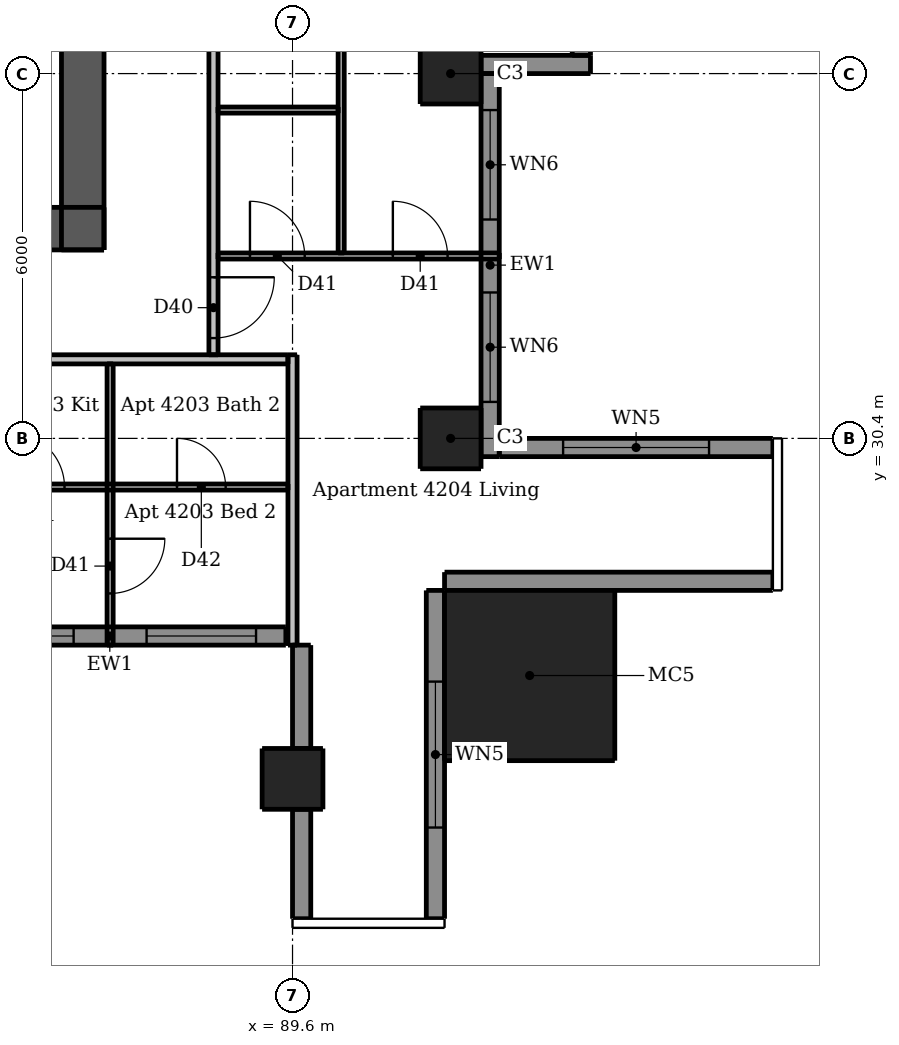
"""IFC4 building model, lengths in metres.
Left out: names, types, materials, properties, quantities, classifications, styles, units other than length and angle.
Written with IfcOpenShell. Run it as: python <this file> out.ifc"""

import sys

from ifc_helpers import new_model, si_unit, direction, frame, frame_2d, origin, origin_2d, place, context, subcontext, project, spatial, rectangle, extrude, element, fill, save


model = new_model("IFC4")
c1 = context("Model", 3, precision=1e-05, world=origin(), true_north=direction((0.0, 1.0)))
c2 = subcontext(c1, "Body", "Model", "MODEL_VIEW")
j1 = project(units=[si_unit("LENGTHUNIT", "METRE"), si_unit("PLANEANGLEUNIT", "RADIAN")], contexts=[c1])
p1 = place(None, origin())
s1 = spatial("IfcSite", under=j1, at=p1, CompositionType="ELEMENT")
p2 = place(p1, origin())
s2 = spatial("IfcBuilding", under=s1, at=p2, CompositionType="ELEMENT")
p3 = place(p2, frame((0.0, 0.0, 158.2)))
s3 = spatial("IfcBuildingStorey", under=s2, at=p3, CompositionType="ELEMENT", Elevation=158.2)
p4 = place(p3, frame((62.5, 33.85, 0.0), z_axis=(0.0, 0.0, 1.0), x_axis=(1.0, 0.0, 0.0)))
e1 = element("IfcWall", 1, at=p4, inside=s3, PredefinedType="SHEAR", context=c2, shape_type="SweptSolid", body=[
    extrude(rectangle(XDim=24.0, YDim=0.7, at=frame_2d((12.0, 0.0))), origin(), (0.0, 0.0, 1.0), 3.05),
])
p5 = place(p4, frame((1.962, 0.0, 0.0)))
e2 = element("IfcOpeningElement", 2, at=p5, cuts=e1, PredefinedType="OPENING", context=c2, shape_type="SweptSolid", body=[
    extrude(rectangle(XDim=1.1, YDim=2.1, at=frame_2d((0.55, 1.05))), frame((0.0, 0.36, 0.0), z_axis=(0.0, -1.0, 0.0), x_axis=(1.0, 0.0, 0.0)), (0.0, 0.0, 1.0), 0.72),
])
p6 = place(p4, frame((20.938, 0.0, 0.0)))
e3 = element("IfcOpeningElement", 3, at=p6, cuts=e1, PredefinedType="OPENING", context=c2, shape_type="SweptSolid", body=[
    extrude(rectangle(XDim=1.1, YDim=2.1, at=frame_2d((0.55, 1.05))), frame((0.0, 0.36, 0.0), z_axis=(0.0, -1.0, 0.0), x_axis=(1.0, 0.0, 0.0)), (0.0, 0.0, 1.0), 0.72),
])
p7 = place(p4, frame((8.0, 0.0, 0.0)))
e4 = element("IfcOpeningElement", 4, at=p7, cuts=e1, PredefinedType="OPENING", context=c2, shape_type="SweptSolid", body=[
    extrude(rectangle(XDim=1.1, YDim=2.1, at=frame_2d((0.55, 1.05))), frame((0.0, 0.36, 0.0), z_axis=(0.0, -1.0, 0.0), x_axis=(1.0, 0.0, 0.0)), (0.0, 0.0, 1.0), 0.72),
])
p8 = place(p4, frame((13.512, 0.0, 0.0)))
e5 = element("IfcOpeningElement", 5, at=p8, cuts=e1, PredefinedType="OPENING", context=c2, shape_type="SweptSolid", body=[
    extrude(rectangle(XDim=0.9, YDim=2.1, at=frame_2d((0.45, 1.05))), frame((0.0, 0.36, 0.0), z_axis=(0.0, -1.0, 0.0), x_axis=(1.0, 0.0, 0.0)), (0.0, 0.0, 1.0), 0.72),
])
p9 = place(p4, frame((17.087, 0.0, 0.0)))
e6 = element("IfcOpeningElement", 6, at=p9, cuts=e1, PredefinedType="OPENING", context=c2, shape_type="SweptSolid", body=[
    extrude(rectangle(XDim=0.9, YDim=2.1, at=frame_2d((0.45, 1.05))), frame((0.0, 0.36, 0.0), z_axis=(0.0, -1.0, 0.0), x_axis=(1.0, 0.0, 0.0)), (0.0, 0.0, 1.0), 0.72),
])
p10 = place(p3, frame((86.15, 33.5, 0.0), z_axis=(0.0, 0.0, 1.0), x_axis=(0.0, 1.0, 0.0)))
e7 = element("IfcWall", 7, at=p10, inside=s3, PredefinedType="SHEAR", context=c2, shape_type="SweptSolid", body=[
    extrude(rectangle(XDim=24.0, YDim=0.7, at=frame_2d((12.0, 0.0))), origin(), (0.0, 0.0, 1.0), 3.05),
])
p11 = place(p10, frame((11.2, 0.0, 0.0)))
e8 = element("IfcOpeningElement", 8, at=p11, cuts=e7, PredefinedType="OPENING", context=c2, shape_type="SweptSolid", body=[
    extrude(rectangle(XDim=1.6, YDim=2.1, at=frame_2d((0.8, 1.05))), frame((0.0, 0.36, 0.0), z_axis=(0.0, -1.0, 0.0), x_axis=(1.0, 0.0, 0.0)), (0.0, 0.0, 1.0), 0.72),
])
for number, where, z_axis, x_axis in (
    (9, (89.6, 24.8, 0.0), (0.0, 0.0, 1.0), (1.0, 0.0, 0.0)),
    (10, (92.2, 30.4, 0.0), (0.0, 0.0, 1.0), (1.0, 0.0, 0.0)),
    (11, (92.2, 36.4, 0.0), (0.0, 0.0, 1.0), (1.0, 0.0, 0.0)),
):
    element("IfcColumn", number, at=place(p3, frame(where, z_axis=z_axis, x_axis=x_axis)), inside=s3, PredefinedType="COLUMN", context=c2, shape_type="SweptSolid", body=[
        extrude(rectangle(XDim=1.0, YDim=1.0, at=origin_2d()), origin(), (0.0, 0.0, 1.0), 3.05),
    ])
p12 = place(p3, frame((93.5, 26.5, 0.0), z_axis=(0.0, 0.0, 1.0), x_axis=(1.0, 0.0, 0.0)))
e12 = element("IfcColumn", 12, at=p12, inside=s3, PredefinedType="COLUMN", context=c2, shape_type="SweptSolid", body=[
    extrude(rectangle(XDim=2.8, YDim=2.8, at=origin_2d()), origin(), (0.0, 0.0, 1.0), 3.3),
])
p13 = place(p3, frame((89.75, 27.0, 0.0), z_axis=(0.0, 0.0, 1.0), x_axis=(0.0, -1.0, 0.0)))
e13 = element("IfcWall", 13, at=p13, inside=s3, PredefinedType="SOLIDWALL", context=c2, shape_type="SweptSolid", body=[
    extrude(rectangle(XDim=1.7, YDim=0.3, at=frame_2d((0.85, 0.0))), origin(), (0.0, 0.0, 1.0), 3.05),
])
p14 = place(p3, frame((89.75, 24.3, 0.0), z_axis=(0.0, 0.0, 1.0), x_axis=(0.0, -1.0, 0.0)))
e14 = element("IfcWall", 14, at=p14, inside=s3, PredefinedType="SOLIDWALL", context=c2, shape_type="SweptSolid", body=[
    extrude(rectangle(XDim=1.8, YDim=0.3, at=frame_2d((0.9, 0.0))), origin(), (0.0, 0.0, 1.0), 3.05),
])
p15 = place(p3, frame((91.95, 22.5, 0.0), z_axis=(0.0, 0.0, 1.0), x_axis=(0.0, 1.0, 0.0)))
e15 = element("IfcWall", 15, at=p15, inside=s3, PredefinedType="SOLIDWALL", context=c2, shape_type="SweptSolid", body=[
    extrude(rectangle(XDim=5.4, YDim=0.3, at=frame_2d((2.7, 0.0))), origin(), (0.0, 0.0, 1.0), 3.05),
])
p16 = place(p15, frame((1.5, 0.0, 0.15)))
e16 = element("IfcOpeningElement", 16, at=p16, cuts=e15, PredefinedType="OPENING", context=c2, shape_type="SweptSolid", body=[
    extrude(rectangle(XDim=2.4, YDim=2.1, at=frame_2d((1.2, 1.05))), frame((0.0, 0.16, 0.0), z_axis=(0.0, -1.0, 0.0), x_axis=(1.0, 0.0, 0.0)), (0.0, 0.0, 1.0), 0.32),
])
p17 = place(p3, frame((92.1, 28.05, 0.0), z_axis=(0.0, 0.0, 1.0), x_axis=(1.0, 0.0, 0.0)))
e17 = element("IfcWall", 17, at=p17, inside=s3, PredefinedType="SOLIDWALL", context=c2, shape_type="SweptSolid", body=[
    extrude(rectangle(XDim=5.4, YDim=0.3, at=frame_2d((2.7, 0.0))), origin(), (0.0, 0.0, 1.0), 3.05),
])
p18 = place(p3, frame((97.5, 30.25, 0.0), z_axis=(0.0, 0.0, 1.0), x_axis=(-1.0, 0.0, 0.0)))
e18 = element("IfcWall", 18, at=p18, inside=s3, PredefinedType="SOLIDWALL", context=c2, shape_type="SweptSolid", body=[
    extrude(rectangle(XDim=4.5, YDim=0.3, at=frame_2d((2.25, 0.0))), origin(), (0.0, 0.0, 1.0), 3.05),
])
p19 = place(p18, frame((1.05, 0.0, 0.15)))
e19 = element("IfcOpeningElement", 19, at=p19, cuts=e18, PredefinedType="OPENING", context=c2, shape_type="SweptSolid", body=[
    extrude(rectangle(XDim=2.4, YDim=2.1, at=frame_2d((1.2, 1.05))), frame((0.0, 0.16, 0.0), z_axis=(0.0, -1.0, 0.0), x_axis=(1.0, 0.0, 0.0)), (0.0, 0.0, 1.0), 0.32),
])
p20 = place(p3, frame((92.7, 36.55, 0.0), z_axis=(0.0, 0.0, 1.0), x_axis=(1.0, 0.0, 0.0)))
e20 = element("IfcWall", 20, at=p20, inside=s3, PredefinedType="SOLIDWALL", context=c2, shape_type="SweptSolid", body=[
    extrude(rectangle(XDim=1.8, YDim=0.3, at=frame_2d((0.9, 0.0))), origin(), (0.0, 0.0, 1.0), 3.05),
])
p21 = place(p3, frame((83.7, 27.15, 0.0), z_axis=(0.0, 0.0, 1.0), x_axis=(1.0, 0.0, 0.0)))
e21 = element("IfcWall", 21, at=p21, inside=s3, PredefinedType="SOLIDWALL", context=c2, shape_type="SweptSolid", body=[
    extrude(rectangle(XDim=5.79, YDim=0.3, at=frame_2d((2.895, 0.0))), origin(), (0.0, 0.0, 1.0), 3.05),
])
p22 = place(p21, frame((0.5, 0.0, 0.15)))
e22 = element("IfcOpeningElement", 22, at=p22, cuts=e21, PredefinedType="OPENING", context=c2, shape_type="SweptSolid", body=[
    extrude(rectangle(XDim=1.8, YDim=2.1, at=frame_2d((0.9, 1.05))), frame((0.0, 0.16, 0.0), z_axis=(0.0, -1.0, 0.0), x_axis=(1.0, 0.0, 0.0)), (0.0, 0.0, 1.0), 0.32),
])
p23 = place(p21, frame((3.5, 0.0, 0.15)))
e23 = element("IfcOpeningElement", 23, at=p23, cuts=e21, PredefinedType="OPENING", context=c2, shape_type="SweptSolid", body=[
    extrude(rectangle(XDim=1.8, YDim=2.1, at=frame_2d((0.9, 1.05))), frame((0.0, 0.16, 0.0), z_axis=(0.0, -1.0, 0.0), x_axis=(1.0, 0.0, 0.0)), (0.0, 0.0, 1.0), 0.32),
])
p24 = place(p3, frame((92.85, 30.1, 0.0), z_axis=(0.0, 0.0, 1.0), x_axis=(0.0, 1.0, 0.0)))
e24 = element("IfcWall", 24, at=p24, inside=s3, PredefinedType="SOLIDWALL", context=c2, shape_type="SweptSolid", body=[
    extrude(rectangle(XDim=6.3, YDim=0.3, at=frame_2d((3.15, 0.0))), origin(), (0.0, 0.0, 1.0), 3.05),
])
p25 = place(p24, frame((0.9, 0.0, 0.15)))
e25 = element("IfcOpeningElement", 25, at=p25, cuts=e24, PredefinedType="OPENING", context=c2, shape_type="SweptSolid", body=[
    extrude(rectangle(XDim=1.8, YDim=2.1, at=frame_2d((0.9, 1.05))), frame((0.0, 0.16, 0.0), z_axis=(0.0, -1.0, 0.0), x_axis=(1.0, 0.0, 0.0)), (0.0, 0.0, 1.0), 0.32),
])
p26 = place(p24, frame((3.9, 0.0, 0.15)))
e26 = element("IfcOpeningElement", 26, at=p26, cuts=e24, PredefinedType="OPENING", context=c2, shape_type="SweptSolid", body=[
    extrude(rectangle(XDim=1.8, YDim=2.1, at=frame_2d((0.9, 1.05))), frame((0.0, 0.16, 0.0), z_axis=(0.0, -1.0, 0.0), x_axis=(1.0, 0.0, 0.0)), (0.0, 0.0, 1.0), 0.32),
])
p27 = place(p3, frame((94.35, 36.7, 0.0), z_axis=(0.0, 0.0, 1.0), x_axis=(0.0, 1.0, 0.0)))
e27 = element("IfcWall", 27, at=p27, inside=s3, PredefinedType="SOLIDWALL", context=c2, shape_type="SweptSolid", body=[
    extrude(rectangle(XDim=5.6, YDim=0.3, at=frame_2d((2.8, 0.0))), origin(), (0.0, 0.0, 1.0), 3.05),
])
p28 = place(p27, frame((0.3, 0.0, 0.15)))
e28 = element("IfcOpeningElement", 28, at=p28, cuts=e27, PredefinedType="OPENING", context=c2, shape_type="SweptSolid", body=[
    extrude(rectangle(XDim=1.8, YDim=2.1, at=frame_2d((0.9, 1.05))), frame((0.0, 0.16, 0.0), z_axis=(0.0, -1.0, 0.0), x_axis=(1.0, 0.0, 0.0)), (0.0, 0.0, 1.0), 0.32),
])
p29 = place(p27, frame((3.3, 0.0, 0.15)))
e29 = element("IfcOpeningElement", 29, at=p29, cuts=e27, PredefinedType="OPENING", context=c2, shape_type="SweptSolid", body=[
    extrude(rectangle(XDim=1.8, YDim=2.1, at=frame_2d((0.9, 1.05))), frame((0.0, 0.16, 0.0), z_axis=(0.0, -1.0, 0.0), x_axis=(1.0, 0.0, 0.0)), (0.0, 0.0, 1.0), 0.32),
])
p30 = place(p3, frame((86.6, 31.625, 0.0), z_axis=(0.0, 0.0, 1.0), x_axis=(0.0, -1.0, 0.0)))
e30 = element("IfcWall", 30, at=p30, inside=s3, PredefinedType="PARTITIONING", context=c2, shape_type="SweptSolid", body=[
    extrude(rectangle(XDim=4.625, YDim=0.1, at=frame_2d((2.312, 0.0))), origin(), (0.0, 0.0, 1.0), 3.05),
])
p31 = place(p30, frame((2.875, 0.0, 0.0)))
e31 = element("IfcOpeningElement", 31, at=p31, cuts=e30, PredefinedType="OPENING", context=c2, shape_type="SweptSolid", body=[
    extrude(rectangle(XDim=0.9, YDim=2.1, at=frame_2d((0.45, 1.05))), frame((0.0, 0.06, 0.0), z_axis=(0.0, -1.0, 0.0), x_axis=(1.0, 0.0, 0.0)), (0.0, 0.0, 1.0), 0.12),
])
p32 = place(p3, frame((90.4, 33.45, 0.0), z_axis=(0.0, 0.0, 1.0), x_axis=(0.0, 1.0, 0.0)))
e32 = element("IfcWall", 32, at=p32, inside=s3, PredefinedType="PARTITIONING", context=c2, shape_type="SweptSolid", body=[
    extrude(rectangle(XDim=8.1, YDim=0.1, at=frame_2d((4.05, 0.0))), origin(), (0.0, 0.0, 1.0), 3.05),
])
p33 = place(p32, frame((3.75, 0.0, 0.0)))
e33 = element("IfcOpeningElement", 33, at=p33, cuts=e32, PredefinedType="OPENING", context=c2, shape_type="SweptSolid", body=[
    extrude(rectangle(XDim=0.8, YDim=2.1, at=frame_2d((0.4, 1.05))), frame((0.0, 0.06, 0.0), z_axis=(0.0, -1.0, 0.0), x_axis=(1.0, 0.0, 0.0)), (0.0, 0.0, 1.0), 0.12),
])
p34 = place(p32, frame((6.55, 0.0, 0.0)))
e34 = element("IfcOpeningElement", 34, at=p34, cuts=e32, PredefinedType="OPENING", context=c2, shape_type="SweptSolid", body=[
    extrude(rectangle(XDim=0.9, YDim=2.1, at=frame_2d((0.45, 1.05))), frame((0.0, 0.06, 0.0), z_axis=(0.0, -1.0, 0.0), x_axis=(1.0, 0.0, 0.0)), (0.0, 0.0, 1.0), 0.12),
])
p35 = place(p3, frame((88.375, 35.8, 0.0), z_axis=(0.0, 0.0, 1.0), x_axis=(1.0, 0.0, 0.0)))
e35 = element("IfcWall", 35, at=p35, inside=s3, PredefinedType="PARTITIONING", context=c2, shape_type="SweptSolid", body=[
    extrude(rectangle(XDim=1.975, YDim=0.1, at=frame_2d((0.988, 0.0))), origin(), (0.0, 0.0, 1.0), 3.05),
])
p36 = place(p3, frame((88.375, 33.4, 0.0), z_axis=(0.0, 0.0, 1.0), x_axis=(1.0, 0.0, 0.0)))
e36 = element("IfcWall", 36, at=p36, inside=s3, PredefinedType="PARTITIONING", context=c2, shape_type="SweptSolid", body=[
    extrude(rectangle(XDim=4.625, YDim=0.1, at=frame_2d((2.312, 0.0))), origin(), (0.0, 0.0, 1.0), 3.05),
])
p37 = place(p36, frame((0.525, 0.0, 0.0)))
e37 = element("IfcOpeningElement", 37, at=p37, cuts=e36, PredefinedType="OPENING", context=c2, shape_type="SweptSolid", body=[
    extrude(rectangle(XDim=0.9, YDim=2.1, at=frame_2d((0.45, 1.05))), frame((0.0, 0.06, 0.0), z_axis=(0.0, -1.0, 0.0), x_axis=(1.0, 0.0, 0.0)), (0.0, 0.0, 1.0), 0.12),
])
p38 = place(p36, frame((2.875, 0.0, 0.0)))
e38 = element("IfcOpeningElement", 38, at=p38, cuts=e36, PredefinedType="OPENING", context=c2, shape_type="SweptSolid", body=[
    extrude(rectangle(XDim=0.9, YDim=2.1, at=frame_2d((0.45, 1.05))), frame((0.0, 0.06, 0.0), z_axis=(0.0, -1.0, 0.0), x_axis=(1.0, 0.0, 0.0)), (0.0, 0.0, 1.0), 0.12),
])
p39 = place(p3, frame((84.25, 29.6, 0.0), z_axis=(0.0, 0.0, 1.0), x_axis=(1.0, 0.0, 0.0)))
e39 = element("IfcWall", 39, at=p39, inside=s3, PredefinedType="PARTITIONING", context=c2, shape_type="SweptSolid", body=[
    extrude(rectangle(XDim=5.275, YDim=0.1, at=frame_2d((2.637, 0.0))), origin(), (0.0, 0.0, 1.0), 3.05),
])
p40 = place(p39, frame((0.7, 0.0, 0.0)))
e40 = element("IfcOpeningElement", 40, at=p40, cuts=e39, PredefinedType="OPENING", context=c2, shape_type="SweptSolid", body=[
    extrude(rectangle(XDim=0.9, YDim=2.1, at=frame_2d((0.45, 1.05))), frame((0.0, 0.06, 0.0), z_axis=(0.0, -1.0, 0.0), x_axis=(1.0, 0.0, 0.0)), (0.0, 0.0, 1.0), 0.12),
])
p41 = place(p39, frame((3.45, 0.0, 0.0)))
e41 = element("IfcOpeningElement", 41, at=p41, cuts=e39, PredefinedType="OPENING", context=c2, shape_type="SweptSolid", body=[
    extrude(rectangle(XDim=0.8, YDim=2.1, at=frame_2d((0.4, 1.05))), frame((0.0, 0.06, 0.0), z_axis=(0.0, -1.0, 0.0), x_axis=(1.0, 0.0, 0.0)), (0.0, 0.0, 1.0), 0.12),
])
p42 = place(p3, frame((88.3, 61.175, 0.0), z_axis=(0.0, 0.0, 1.0), x_axis=(0.0, -1.0, 0.0)))
e42 = element("IfcWall", 42, at=p42, inside=s3, PredefinedType="PARTITIONING", context=c2, shape_type="SweptSolid", body=[
    extrude(rectangle(XDim=29.4, YDim=0.15, at=frame_2d((14.7, 0.0))), origin(), (0.0, 0.0, 1.0), 3.05),
])
p43 = place(p42, frame((28.125, 0.0, 0.0)))
e43 = element("IfcOpeningElement", 43, at=p43, cuts=e42, PredefinedType="OPENING", context=c2, shape_type="SweptSolid", body=[
    extrude(rectangle(XDim=1.0, YDim=2.1, at=frame_2d((0.5, 1.05))), frame((0.0, 0.085, 0.0), z_axis=(0.0, -1.0, 0.0), x_axis=(1.0, 0.0, 0.0)), (0.0, 0.0, 1.0), 0.17),
])
p44 = place(p42, frame((18.275, 0.0, 0.0)))
e44 = element("IfcOpeningElement", 44, at=p44, cuts=e42, PredefinedType="OPENING", context=c2, shape_type="SweptSolid", body=[
    extrude(rectangle(XDim=1.0, YDim=2.1, at=frame_2d((0.5, 1.05))), frame((0.0, 0.085, 0.0), z_axis=(0.0, -1.0, 0.0), x_axis=(1.0, 0.0, 0.0)), (0.0, 0.0, 1.0), 0.17),
])
p45 = place(p42, frame((10.475, 0.0, 0.0)))
e45 = element("IfcOpeningElement", 45, at=p45, cuts=e42, PredefinedType="OPENING", context=c2, shape_type="SweptSolid", body=[
    extrude(rectangle(XDim=1.0, YDim=2.1, at=frame_2d((0.5, 1.05))), frame((0.0, 0.085, 0.0), z_axis=(0.0, -1.0, 0.0), x_axis=(1.0, 0.0, 0.0)), (0.0, 0.0, 1.0), 0.17),
])
p46 = place(p42, frame((3.275, 0.0, 0.0)))
e46 = element("IfcOpeningElement", 46, at=p46, cuts=e42, PredefinedType="OPENING", context=c2, shape_type="SweptSolid", body=[
    extrude(rectangle(XDim=1.0, YDim=2.1, at=frame_2d((0.5, 1.05))), frame((0.0, 0.085, 0.0), z_axis=(0.0, -1.0, 0.0), x_axis=(1.0, 0.0, 0.0)), (0.0, 0.0, 1.0), 0.17),
])
p47 = place(p3, frame((89.6, 27.0, 0.0), z_axis=(0.0, 0.0, 1.0), x_axis=(0.0, 1.0, 0.0)))
e47 = element("IfcWall", 47, at=p47, inside=s3, PredefinedType="PARTITIONING", context=c2, shape_type="SweptSolid", body=[
    extrude(rectangle(XDim=4.775, YDim=0.15, at=frame_2d((2.387, 0.0))), origin(), (0.0, 0.0, 1.0), 2.51),
])
p48 = place(p3, frame((89.525, 31.7, 0.0), z_axis=(0.0, 0.0, 1.0), x_axis=(-1.0, 0.0, 0.0)))
e48 = element("IfcWall", 48, at=p48, inside=s3, PredefinedType="PARTITIONING", context=c2, shape_type="SweptSolid", body=[
    extrude(rectangle(XDim=30.55, YDim=0.15, at=frame_2d((15.275, 0.0))), origin(), (0.0, 0.0, 1.0), 3.05),
])
p49 = place(p48, frame((26.775, 0.0, 0.0)))
e49 = element("IfcOpeningElement", 49, at=p49, cuts=e48, PredefinedType="OPENING", context=c2, shape_type="SweptSolid", body=[
    extrude(rectangle(XDim=1.0, YDim=2.1, at=frame_2d((0.5, 1.05))), frame((0.0, 0.085, 0.0), z_axis=(0.0, -1.0, 0.0), x_axis=(1.0, 0.0, 0.0)), (0.0, 0.0, 1.0), 0.17),
])
p50 = place(p48, frame((14.425, 0.0, 0.0)))
e50 = element("IfcOpeningElement", 50, at=p50, cuts=e48, PredefinedType="OPENING", context=c2, shape_type="SweptSolid", body=[
    extrude(rectangle(XDim=1.0, YDim=2.1, at=frame_2d((0.5, 1.05))), frame((0.0, 0.085, 0.0), z_axis=(0.0, -1.0, 0.0), x_axis=(1.0, 0.0, 0.0)), (0.0, 0.0, 1.0), 0.17),
])
p51 = place(p48, frame((6.575, 0.0, 0.0)))
e51 = element("IfcOpeningElement", 51, at=p51, cuts=e48, PredefinedType="OPENING", context=c2, shape_type="SweptSolid", body=[
    extrude(rectangle(XDim=1.0, YDim=2.1, at=frame_2d((0.5, 1.05))), frame((0.0, 0.085, 0.0), z_axis=(0.0, -1.0, 0.0), x_axis=(1.0, 0.0, 0.0)), (0.0, 0.0, 1.0), 0.17),
])
p52 = place(p16, origin())
e52 = element("IfcWindow", 52, at=p52, inside=s3, PartitioningType="DOUBLE_PANEL_VERTICAL", PredefinedType="WINDOW", context=c2, shape_type="SweptSolid", body=[
    extrude(rectangle(XDim=2.4, YDim=2.1, at=frame_2d((1.2, 1.05))), frame((0.0, 0.03, 0.0), z_axis=(0.0, -1.0, 0.0), x_axis=(1.0, 0.0, 0.0)), (0.0, 0.0, 1.0), 0.06),
])
fill(e16, e52)
p53 = place(p19, origin())
e53 = element("IfcWindow", 53, at=p53, inside=s3, PartitioningType="DOUBLE_PANEL_VERTICAL", PredefinedType="WINDOW", context=c2, shape_type="SweptSolid", body=[
    extrude(rectangle(XDim=2.4, YDim=2.1, at=frame_2d((1.2, 1.05))), frame((0.0, 0.03, 0.0), z_axis=(0.0, -1.0, 0.0), x_axis=(1.0, 0.0, 0.0)), (0.0, 0.0, 1.0), 0.06),
])
fill(e19, e53)
p54 = place(p22, origin())
e54 = element("IfcWindow", 54, at=p54, inside=s3, PartitioningType="DOUBLE_PANEL_VERTICAL", PredefinedType="WINDOW", context=c2, shape_type="SweptSolid", body=[
    extrude(rectangle(XDim=1.8, YDim=2.1, at=frame_2d((0.9, 1.05))), frame((0.0, 0.03, 0.0), z_axis=(0.0, -1.0, 0.0), x_axis=(1.0, 0.0, 0.0)), (0.0, 0.0, 1.0), 0.06),
])
fill(e22, e54)
p55 = place(p23, origin())
e55 = element("IfcWindow", 55, at=p55, inside=s3, PartitioningType="DOUBLE_PANEL_VERTICAL", PredefinedType="WINDOW", context=c2, shape_type="SweptSolid", body=[
    extrude(rectangle(XDim=1.8, YDim=2.1, at=frame_2d((0.9, 1.05))), frame((0.0, 0.03, 0.0), z_axis=(0.0, -1.0, 0.0), x_axis=(1.0, 0.0, 0.0)), (0.0, 0.0, 1.0), 0.06),
])
fill(e23, e55)
p56 = place(p25, origin())
e56 = element("IfcWindow", 56, at=p56, inside=s3, PartitioningType="DOUBLE_PANEL_VERTICAL", PredefinedType="WINDOW", context=c2, shape_type="SweptSolid", body=[
    extrude(rectangle(XDim=1.8, YDim=2.1, at=frame_2d((0.9, 1.05))), frame((0.0, 0.03, 0.0), z_axis=(0.0, -1.0, 0.0), x_axis=(1.0, 0.0, 0.0)), (0.0, 0.0, 1.0), 0.06),
])
fill(e25, e56)
p57 = place(p26, origin())
e57 = element("IfcWindow", 57, at=p57, inside=s3, PartitioningType="DOUBLE_PANEL_VERTICAL", PredefinedType="WINDOW", context=c2, shape_type="SweptSolid", body=[
    extrude(rectangle(XDim=1.8, YDim=2.1, at=frame_2d((0.9, 1.05))), frame((0.0, 0.03, 0.0), z_axis=(0.0, -1.0, 0.0), x_axis=(1.0, 0.0, 0.0)), (0.0, 0.0, 1.0), 0.06),
])
fill(e26, e57)
p58 = place(p40, origin())
e58 = element("IfcDoor", 58, at=p58, inside=s3, OperationType="SINGLE_SWING_LEFT", PredefinedType="DOOR", context=c2, shape_type="SweptSolid", body=[
    extrude(rectangle(XDim=0.9, YDim=2.1, at=frame_2d((0.45, 1.05))), frame((0.0, 0.025, 0.0), z_axis=(0.0, -1.0, 0.0), x_axis=(1.0, 0.0, 0.0)), (0.0, 0.0, 1.0), 0.05),
])
fill(e40, e58)
p59 = place(p31, origin())
e59 = element("IfcDoor", 59, at=p59, inside=s3, OperationType="SINGLE_SWING_LEFT", PredefinedType="DOOR", context=c2, shape_type="SweptSolid", body=[
    extrude(rectangle(XDim=0.9, YDim=2.1, at=frame_2d((0.45, 1.05))), frame((0.0, 0.025, 0.0), z_axis=(0.0, -1.0, 0.0), x_axis=(1.0, 0.0, 0.0)), (0.0, 0.0, 1.0), 0.05),
])
fill(e31, e59)
p60 = place(p41, origin())
e60 = element("IfcDoor", 60, at=p60, inside=s3, OperationType="SINGLE_SWING_LEFT", PredefinedType="DOOR", context=c2, shape_type="SweptSolid", body=[
    extrude(rectangle(XDim=0.8, YDim=2.1, at=frame_2d((0.4, 1.05))), frame((0.0, 0.025, 0.0), z_axis=(0.0, -1.0, 0.0), x_axis=(1.0, 0.0, 0.0)), (0.0, 0.0, 1.0), 0.05),
])
fill(e41, e60)
p61 = place(p43, origin())
e61 = element("IfcDoor", 61, at=p61, inside=s3, OperationType="SINGLE_SWING_LEFT", PredefinedType="DOOR", context=c2, shape_type="SweptSolid", body=[
    extrude(rectangle(XDim=1.0, YDim=2.1, at=frame_2d((0.5, 1.05))), frame((0.0, 0.025, 0.0), z_axis=(0.0, -1.0, 0.0), x_axis=(1.0, 0.0, 0.0)), (0.0, 0.0, 1.0), 0.05),
])
fill(e43, e61)
p62 = place(p37, origin())
e62 = element("IfcDoor", 62, at=p62, inside=s3, OperationType="SINGLE_SWING_LEFT", PredefinedType="DOOR", context=c2, shape_type="SweptSolid", body=[
    extrude(rectangle(XDim=0.9, YDim=2.1, at=frame_2d((0.45, 1.05))), frame((0.0, 0.025, 0.0), z_axis=(0.0, -1.0, 0.0), x_axis=(1.0, 0.0, 0.0)), (0.0, 0.0, 1.0), 0.05),
])
fill(e37, e62)
p63 = place(p38, origin())
e63 = element("IfcDoor", 63, at=p63, inside=s3, OperationType="SINGLE_SWING_LEFT", PredefinedType="DOOR", context=c2, shape_type="SweptSolid", body=[
    extrude(rectangle(XDim=0.9, YDim=2.1, at=frame_2d((0.45, 1.05))), frame((0.0, 0.025, 0.0), z_axis=(0.0, -1.0, 0.0), x_axis=(1.0, 0.0, 0.0)), (0.0, 0.0, 1.0), 0.05),
])
fill(e38, e63)
save(model, sys.argv[1])
